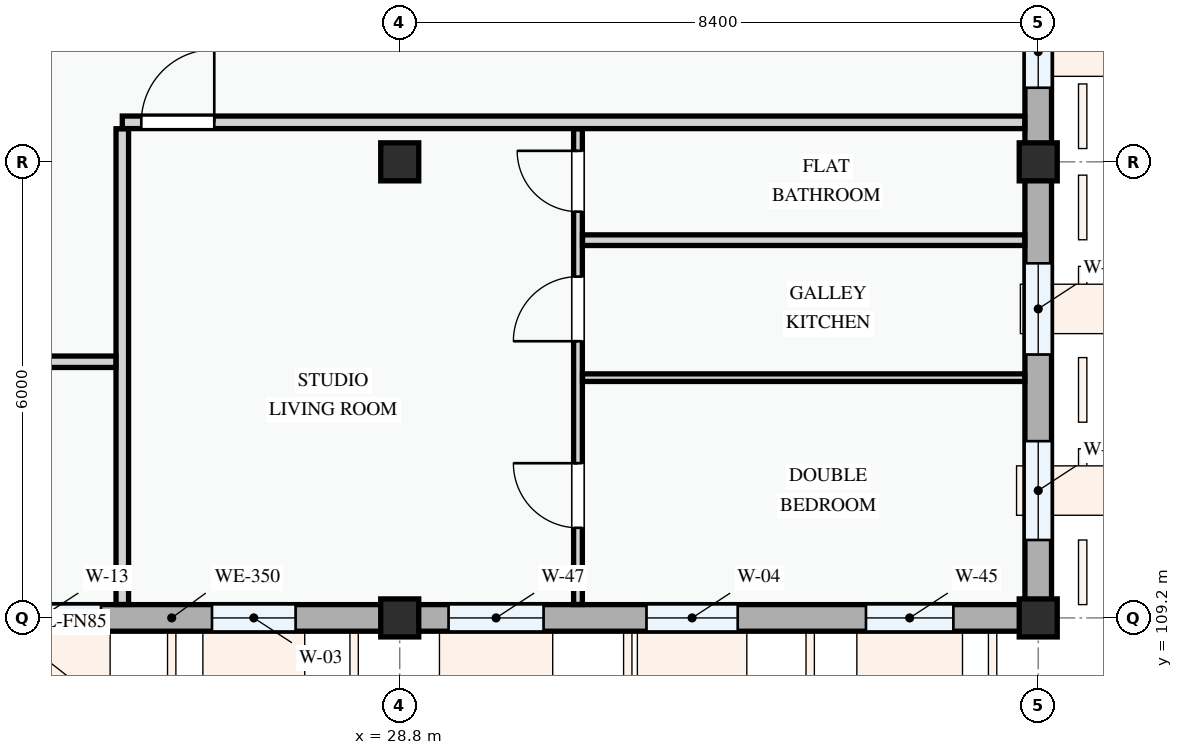
"""IFC4 building model, lengths in metres.
Left out: names, types, materials, properties, quantities, classifications, styles, units other than length and angle.
Written with IfcOpenShell. Run it as: python <this file> out.ifc"""

import sys

from ifc_helpers import new_model, si_unit, direction, frame, frame_2d, origin, origin_2d, place, context, subcontext, project, spatial, rectangle, extrude, element, fill, save


model = new_model("IFC4")
c1 = context("Model", 3, precision=1e-05, world=origin(), true_north=direction((0.0, 1.0)))
c2 = subcontext(c1, "Body", "Model", "MODEL_VIEW")
j1 = project(units=[si_unit("LENGTHUNIT", "METRE"), si_unit("PLANEANGLEUNIT", "RADIAN")], contexts=[c1])
p1 = place(None, origin())
s1 = spatial("IfcSite", under=j1, at=p1, CompositionType="ELEMENT")
p2 = place(p1, origin())
s2 = spatial("IfcBuilding", under=s1, at=p2, CompositionType="ELEMENT")
p3 = place(p2, frame((0.0, 0.0, 47.7)))
s3 = spatial("IfcBuildingStorey", under=s2, at=p3, CompositionType="ELEMENT", Elevation=47.7)
for number, where, z_axis, x_axis in (
    (1, (28.8, 109.2, 0.0), (0.0, 0.0, 1.0), (1.0, 0.0, 0.0)),
    (2, (28.8, 115.2, 0.0), (0.0, 0.0, 1.0), (1.0, 0.0, 0.0)),
    (3, (37.2, 109.2, 0.0), (0.0, 0.0, 1.0), (1.0, 0.0, 0.0)),
    (4, (37.2, 115.2, 0.0), (0.0, 0.0, 1.0), (1.0, 0.0, 0.0)),
):
    element("IfcColumn", number, at=place(p3, frame(where, z_axis=z_axis, x_axis=x_axis)), inside=s3, PredefinedType="COLUMN", context=c2, shape_type="SweptSolid", body=[
        extrude(rectangle(XDim=0.5, YDim=0.5, at=origin_2d()), origin(), (0.0, 0.0, 1.0), 3.3),
    ])
p4 = place(p3, frame((22.8, 109.2, 0.0), z_axis=(0.0, 0.0, 1.0), x_axis=(1.0, 0.0, 0.0)))
e5 = element("IfcWall", 5, at=p4, inside=s3, PredefinedType="STANDARD", context=c2, shape_type="SweptSolid", body=[
    extrude(rectangle(XDim=6.0, YDim=0.35, at=frame_2d((3.0, 0.0))), origin(), (0.0, 0.0, 1.0), 2.525),
])
p5 = place(p4, frame((0.47, 0.0, 0.78)))
e6 = element("IfcOpeningElement", 6, at=p5, cuts=e5, PredefinedType="OPENING", context=c2, shape_type="SweptSolid", body=[
    extrude(rectangle(XDim=1.6, YDim=1.55, at=frame_2d((0.8, 0.775))), frame((0.0, 0.185, 0.0), z_axis=(0.0, -1.0, 0.0), x_axis=(1.0, 0.0, 0.0)), (0.0, 0.0, 1.0), 0.37),
])
p6 = place(p4, frame((3.53, 0.0, 0.78)))
e7 = element("IfcOpeningElement", 7, at=p6, cuts=e5, PredefinedType="OPENING", context=c2, shape_type="SweptSolid", body=[
    extrude(rectangle(XDim=1.1, YDim=1.3, at=frame_2d((0.55, 0.65))), frame((0.0, 0.185, 0.0), z_axis=(0.0, -1.0, 0.0), x_axis=(1.0, 0.0, 0.0)), (0.0, 0.0, 1.0), 0.37),
])
p7 = place(p3, frame((28.8, 109.2, 0.0), z_axis=(0.0, 0.0, 1.0), x_axis=(1.0, 0.0, 0.0)))
e8 = element("IfcWall", 8, at=p7, inside=s3, PredefinedType="STANDARD", context=c2, shape_type="SweptSolid", body=[
    extrude(rectangle(XDim=8.4, YDim=0.35, at=frame_2d((4.2, 0.0))), origin(), (0.0, 0.0, 1.0), 2.375),
])
p8 = place(p7, frame((0.643, 0.0, 0.78)))
e9 = element("IfcOpeningElement", 9, at=p8, cuts=e8, PredefinedType="OPENING", context=c2, shape_type="SweptSolid", body=[
    extrude(rectangle(XDim=1.25, YDim=1.45, at=frame_2d((0.625, 0.725))), frame((0.0, 0.185, 0.0), z_axis=(0.0, -1.0, 0.0), x_axis=(1.0, 0.0, 0.0)), (0.0, 0.0, 1.0), 0.37),
])
p9 = place(p7, frame((3.246, 0.0, 0.78)))
e10 = element("IfcOpeningElement", 10, at=p9, cuts=e8, PredefinedType="OPENING", context=c2, shape_type="SweptSolid", body=[
    extrude(rectangle(XDim=1.2, YDim=1.35, at=frame_2d((0.6, 0.675))), frame((0.0, 0.185, 0.0), z_axis=(0.0, -1.0, 0.0), x_axis=(1.0, 0.0, 0.0)), (0.0, 0.0, 1.0), 0.37),
])
p10 = place(p7, frame((6.134, 0.0, 0.78)))
e11 = element("IfcOpeningElement", 11, at=p10, cuts=e8, PredefinedType="OPENING", context=c2, shape_type="SweptSolid", body=[
    extrude(rectangle(XDim=1.15, YDim=1.25, at=frame_2d((0.575, 0.625))), frame((0.0, 0.185, 0.0), z_axis=(0.0, -1.0, 0.0), x_axis=(1.0, 0.0, 0.0)), (0.0, 0.0, 1.0), 0.37),
])
p11 = place(p3, frame((37.2, 109.2, 0.0), z_axis=(0.0, 0.0, 1.0), x_axis=(0.0, 1.0, 0.0)))
e12 = element("IfcWall", 12, at=p11, inside=s3, PredefinedType="STANDARD", context=c2, shape_type="SweptSolid", body=[
    extrude(rectangle(XDim=6.0, YDim=0.35, at=frame_2d((3.0, 0.0))), origin(), (0.0, 0.0, 1.0), 2.575),
])
p12 = place(p11, frame((1.025, 0.0, 0.78)))
e13 = element("IfcOpeningElement", 13, at=p12, cuts=e12, PredefinedType="OPENING", context=c2, shape_type="SweptSolid", body=[
    extrude(rectangle(XDim=1.3, YDim=1.4, at=frame_2d((0.65, 0.7))), frame((0.0, 0.185, 0.0), z_axis=(0.0, -1.0, 0.0), x_axis=(1.0, 0.0, 0.0)), (0.0, 0.0, 1.0), 0.37),
])
p13 = place(p11, frame((3.465, 0.0, 0.78)))
e14 = element("IfcOpeningElement", 14, at=p13, cuts=e12, PredefinedType="OPENING", context=c2, shape_type="SweptSolid", body=[
    extrude(rectangle(XDim=1.2, YDim=1.5, at=frame_2d((0.6, 0.75))), frame((0.0, 0.185, 0.0), z_axis=(0.0, -1.0, 0.0), x_axis=(1.0, 0.0, 0.0)), (0.0, 0.0, 1.0), 0.37),
])
p14 = place(p3, frame((37.2, 115.2, 0.0), z_axis=(0.0, 0.0, 1.0), x_axis=(0.0, 1.0, 0.0)))
e15 = element("IfcWall", 15, at=p14, inside=s3, PredefinedType="STANDARD", context=c2, shape_type="SweptSolid", body=[
    extrude(rectangle(XDim=8.4, YDim=0.35, at=frame_2d((4.2, 0.0))), origin(), (0.0, 0.0, 1.0), 2.425),
])
p15 = place(p14, frame((0.975, 0.0, 0.78)))
e16 = element("IfcOpeningElement", 16, at=p15, cuts=e15, PredefinedType="OPENING", context=c2, shape_type="SweptSolid", body=[
    extrude(rectangle(XDim=0.95, YDim=1.15, at=frame_2d((0.475, 0.575))), frame((0.0, 0.185, 0.0), z_axis=(0.0, -1.0, 0.0), x_axis=(1.0, 0.0, 0.0)), (0.0, 0.0, 1.0), 0.37),
])
p16 = place(p14, frame((4.145, 0.0, 0.78)))
e17 = element("IfcOpeningElement", 17, at=p16, cuts=e15, PredefinedType="OPENING", context=c2, shape_type="SweptSolid", body=[
    extrude(rectangle(XDim=1.0, YDim=1.25, at=frame_2d((0.5, 0.625))), frame((0.0, 0.185, 0.0), z_axis=(0.0, -1.0, 0.0), x_axis=(1.0, 0.0, 0.0)), (0.0, 0.0, 1.0), 0.37),
])
p17 = place(p14, frame((6.344, 0.0, 0.78)))
e18 = element("IfcOpeningElement", 18, at=p17, cuts=e15, PredefinedType="OPENING", context=c2, shape_type="SweptSolid", body=[
    extrude(rectangle(XDim=1.0, YDim=1.25, at=frame_2d((0.5, 0.625))), frame((0.0, 0.185, 0.0), z_axis=(0.0, -1.0, 0.0), x_axis=(1.0, 0.0, 0.0)), (0.0, 0.0, 1.0), 0.37),
])
p18 = place(p3, frame((25.15, 109.377, 0.0), z_axis=(0.0, 0.0, 1.0), x_axis=(0.0, 1.0, 0.0)))
e19 = element("IfcWall", 19, at=p18, inside=s3, PredefinedType="PARTITIONING", context=c2, shape_type="SweptSolid", body=[
    extrude(rectangle(XDim=6.259, YDim=0.165, at=frame_2d((3.129, 0.0))), origin(), (0.0, 0.0, 1.0), 3.0),
])
p19 = place(p3, frame((22.66, 112.57, 0.0), z_axis=(0.0, 0.0, 1.0), x_axis=(1.0, 0.0, 0.0)))
e20 = element("IfcWall", 20, at=p19, inside=s3, PredefinedType="PARTITIONING", context=c2, shape_type="SweptSolid", body=[
    extrude(rectangle(XDim=2.406, YDim=0.15, at=frame_2d((1.203, 0.0))), origin(), (0.0, 0.0, 1.0), 3.0),
])
p20 = place(p3, frame((31.145, 109.377, 0.0), z_axis=(0.0, 0.0, 1.0), x_axis=(0.0, 1.0, 0.0)))
e21 = element("IfcWall", 21, at=p20, inside=s3, PredefinedType="PARTITIONING", context=c2, shape_type="SweptSolid", body=[
    extrude(rectangle(XDim=6.259, YDim=0.115, at=frame_2d((3.129, 0.0))), origin(), (0.0, 0.0, 1.0), 3.0),
])
p21 = place(p20, frame((1.008, 0.0, 0.0)))
e22 = element("IfcOpeningElement", 22, at=p21, cuts=e21, PredefinedType="OPENING", context=c2, shape_type="SweptSolid", body=[
    extrude(rectangle(XDim=0.85, YDim=2.1, at=frame_2d((0.425, 1.05))), frame((0.0, 0.067, 0.0), z_axis=(0.0, -1.0, 0.0), x_axis=(1.0, 0.0, 0.0)), (0.0, 0.0, 1.0), 0.135),
])
p22 = place(p20, frame((3.463, 0.0, 0.0)))
e23 = element("IfcOpeningElement", 23, at=p22, cuts=e21, PredefinedType="OPENING", context=c2, shape_type="SweptSolid", body=[
    extrude(rectangle(XDim=0.85, YDim=2.1, at=frame_2d((0.425, 1.05))), frame((0.0, 0.067, 0.0), z_axis=(0.0, -1.0, 0.0), x_axis=(1.0, 0.0, 0.0)), (0.0, 0.0, 1.0), 0.135),
])
p23 = place(p20, frame((5.168, 0.0, 0.0)))
e24 = element("IfcOpeningElement", 24, at=p23, cuts=e21, PredefinedType="OPENING", context=c2, shape_type="SweptSolid", body=[
    extrude(rectangle(XDim=0.8, YDim=2.1, at=frame_2d((0.4, 1.05))), frame((0.0, 0.067, 0.0), z_axis=(0.0, -1.0, 0.0), x_axis=(1.0, 0.0, 0.0)), (0.0, 0.0, 1.0), 0.135),
])
p24 = place(p3, frame((31.205, 112.361, 0.0), z_axis=(0.0, 0.0, 1.0), x_axis=(1.0, 0.0, 0.0)))
e25 = element("IfcWall", 25, at=p24, inside=s3, PredefinedType="PARTITIONING", context=c2, shape_type="SweptSolid", body=[
    extrude(rectangle(XDim=5.818, YDim=0.1, at=frame_2d((2.909, 0.0))), origin(), (0.0, 0.0, 1.0), 3.0),
])
p25 = place(p3, frame((31.205, 114.17, 0.0), z_axis=(0.0, 0.0, 1.0), x_axis=(1.0, 0.0, 0.0)))
e26 = element("IfcWall", 26, at=p25, inside=s3, PredefinedType="PARTITIONING", context=c2, shape_type="SweptSolid", body=[
    extrude(rectangle(XDim=5.818, YDim=0.14, at=frame_2d((2.909, 0.0))), origin(), (0.0, 0.0, 1.0), 3.0),
])
p26 = place(p3, frame((25.15, 115.72, 0.0), z_axis=(0.0, 0.0, 1.0), x_axis=(1.0, 0.0, 0.0)))
e27 = element("IfcWall", 27, at=p26, inside=s3, PredefinedType="PARTITIONING", context=c2, shape_type="SweptSolid", body=[
    extrude(rectangle(XDim=11.873, YDim=0.165, at=frame_2d((5.937, 0.0))), origin(), (0.0, 0.0, 1.0), 3.0),
])
p27 = place(p26, frame((0.25, 0.0, 0.0)))
e28 = element("IfcOpeningElement", 28, at=p27, cuts=e27, PredefinedType="OPENING", context=c2, shape_type="SweptSolid", body=[
    extrude(rectangle(XDim=0.96, YDim=2.12, at=frame_2d((0.48, 1.06))), frame((0.0, 0.093, 0.0), z_axis=(0.0, -1.0, 0.0), x_axis=(1.0, 0.0, 0.0)), (0.0, 0.0, 1.0), 0.185),
])
p28 = place(p5, origin())
e29 = element("IfcWindow", 29, at=p28, inside=s3, PartitioningType="DOUBLE_PANEL_VERTICAL", PredefinedType="WINDOW", context=c2, shape_type="SweptSolid", body=[
    extrude(rectangle(XDim=1.6, YDim=1.55, at=frame_2d((0.8, 0.775))), frame((0.0, 0.03, 0.0), z_axis=(0.0, -1.0, 0.0), x_axis=(1.0, 0.0, 0.0)), (0.0, 0.0, 1.0), 0.06),
])
fill(e6, e29)
p29 = place(p6, origin())
e30 = element("IfcWindow", 30, at=p29, inside=s3, PartitioningType="SINGLE_PANEL", PredefinedType="WINDOW", context=c2, shape_type="SweptSolid", body=[
    extrude(rectangle(XDim=1.1, YDim=1.3, at=frame_2d((0.55, 0.65))), frame((0.0, 0.03, 0.0), z_axis=(0.0, -1.0, 0.0), x_axis=(1.0, 0.0, 0.0)), (0.0, 0.0, 1.0), 0.06),
])
fill(e7, e30)
p30 = place(p8, origin())
e31 = element("IfcWindow", 31, at=p30, inside=s3, PartitioningType="SINGLE_PANEL", PredefinedType="WINDOW", context=c2, shape_type="SweptSolid", body=[
    extrude(rectangle(XDim=1.25, YDim=1.45, at=frame_2d((0.625, 0.725))), frame((0.0, 0.03, 0.0), z_axis=(0.0, -1.0, 0.0), x_axis=(1.0, 0.0, 0.0)), (0.0, 0.0, 1.0), 0.06),
])
fill(e9, e31)
p31 = place(p9, origin())
e32 = element("IfcWindow", 32, at=p31, inside=s3, PartitioningType="SINGLE_PANEL", PredefinedType="WINDOW", context=c2, shape_type="SweptSolid", body=[
    extrude(rectangle(XDim=1.2, YDim=1.35, at=frame_2d((0.6, 0.675))), frame((0.0, 0.03, 0.0), z_axis=(0.0, -1.0, 0.0), x_axis=(1.0, 0.0, 0.0)), (0.0, 0.0, 1.0), 0.06),
])
fill(e10, e32)
p32 = place(p10, origin())
e33 = element("IfcWindow", 33, at=p32, inside=s3, PartitioningType="SINGLE_PANEL", PredefinedType="WINDOW", context=c2, shape_type="SweptSolid", body=[
    extrude(rectangle(XDim=1.15, YDim=1.25, at=frame_2d((0.575, 0.625))), frame((0.0, 0.03, 0.0), z_axis=(0.0, -1.0, 0.0), x_axis=(1.0, 0.0, 0.0)), (0.0, 0.0, 1.0), 0.06),
])
fill(e11, e33)
p33 = place(p12, origin())
e34 = element("IfcWindow", 34, at=p33, inside=s3, PartitioningType="SINGLE_PANEL", PredefinedType="WINDOW", context=c2, shape_type="SweptSolid", body=[
    extrude(rectangle(XDim=1.3, YDim=1.4, at=frame_2d((0.65, 0.7))), frame((0.0, 0.03, 0.0), z_axis=(0.0, -1.0, 0.0), x_axis=(1.0, 0.0, 0.0)), (0.0, 0.0, 1.0), 0.06),
])
fill(e13, e34)
p34 = place(p13, origin())
e35 = element("IfcWindow", 35, at=p34, inside=s3, PartitioningType="SINGLE_PANEL", PredefinedType="WINDOW", context=c2, shape_type="SweptSolid", body=[
    extrude(rectangle(XDim=1.2, YDim=1.5, at=frame_2d((0.6, 0.75))), frame((0.0, 0.03, 0.0), z_axis=(0.0, -1.0, 0.0), x_axis=(1.0, 0.0, 0.0)), (0.0, 0.0, 1.0), 0.06),
])
fill(e14, e35)
p35 = place(p15, origin())
e36 = element("IfcWindow", 36, at=p35, inside=s3, PartitioningType="SINGLE_PANEL", PredefinedType="WINDOW", context=c2, shape_type="SweptSolid", body=[
    extrude(rectangle(XDim=0.95, YDim=1.15, at=frame_2d((0.475, 0.575))), frame((0.0, 0.03, 0.0), z_axis=(0.0, -1.0, 0.0), x_axis=(1.0, 0.0, 0.0)), (0.0, 0.0, 1.0), 0.06),
])
fill(e16, e36)
p36 = place(p21, origin())
e37 = element("IfcDoor", 37, at=p36, inside=s3, OperationType="SINGLE_SWING_RIGHT", PredefinedType="DOOR", context=c2, shape_type="SweptSolid", body=[
    extrude(rectangle(XDim=0.85, YDim=2.1, at=frame_2d((0.425, 1.05))), frame((0.0, 0.025, 0.0), z_axis=(0.0, -1.0, 0.0), x_axis=(1.0, 0.0, 0.0)), (0.0, 0.0, 1.0), 0.05),
])
fill(e22, e37)
p37 = place(p22, origin())
e38 = element("IfcDoor", 38, at=p37, inside=s3, OperationType="SINGLE_SWING_LEFT", PredefinedType="DOOR", context=c2, shape_type="SweptSolid", body=[
    extrude(rectangle(XDim=0.85, YDim=2.1, at=frame_2d((0.425, 1.05))), frame((0.0, 0.025, 0.0), z_axis=(0.0, -1.0, 0.0), x_axis=(1.0, 0.0, 0.0)), (0.0, 0.0, 1.0), 0.05),
])
fill(e23, e38)
p38 = place(p23, origin())
e39 = element("IfcDoor", 39, at=p38, inside=s3, OperationType="SINGLE_SWING_RIGHT", PredefinedType="DOOR", context=c2, shape_type="SweptSolid", body=[
    extrude(rectangle(XDim=0.8, YDim=2.1, at=frame_2d((0.4, 1.05))), frame((0.0, 0.025, 0.0), z_axis=(0.0, -1.0, 0.0), x_axis=(1.0, 0.0, 0.0)), (0.0, 0.0, 1.0), 0.05),
])
fill(e24, e39)
p39 = place(p27, origin())
e40 = element("IfcDoor", 40, at=p39, inside=s3, OperationType="SINGLE_SWING_RIGHT", PredefinedType="DOOR", context=c2, shape_type="SweptSolid", body=[
    extrude(rectangle(XDim=0.96, YDim=2.12, at=frame_2d((0.48, 1.06))), frame((0.0, 0.025, 0.0), z_axis=(0.0, -1.0, 0.0), x_axis=(1.0, 0.0, 0.0)), (0.0, 0.0, 1.0), 0.05),
])
fill(e28, e40)
save(model, sys.argv[1])
